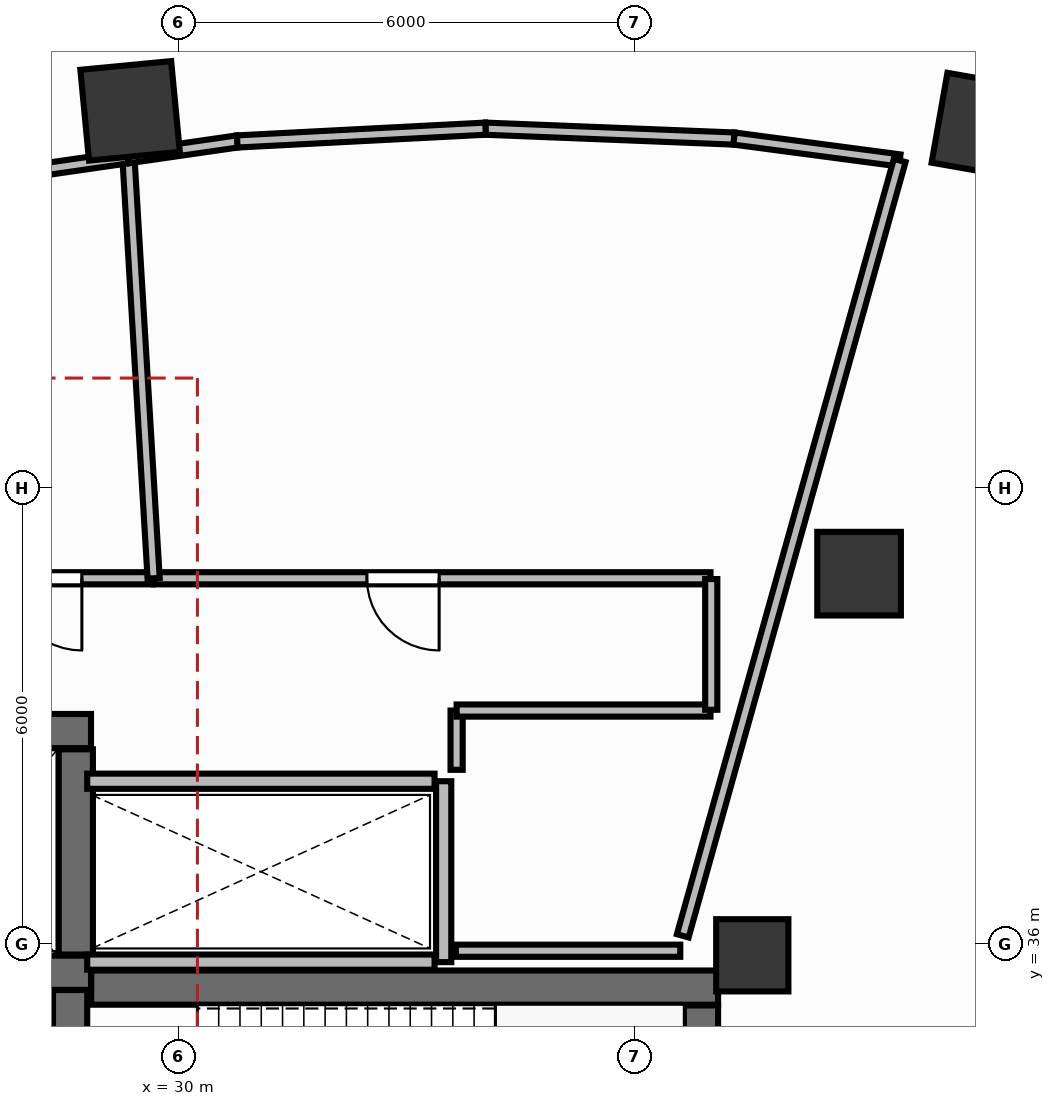
"""IFC4 building model, lengths in metres.
Left out: names, types, materials, properties, quantities, classifications, styles, units other than length and angle.
Written with IfcOpenShell. Run it as: python <this file> out.ifc"""

import sys

from ifc_helpers import new_model, si_unit, direction, frame, frame_2d, origin, origin_2d, place, context, subcontext, project, spatial, rectangle, extrude, element, fill, save


model = new_model("IFC4")
c1 = context("Model", 3, precision=1e-05, world=origin(), true_north=direction((0.0, 1.0)))
c2 = subcontext(c1, "Body", "Model", "MODEL_VIEW")
j1 = project(units=[si_unit("LENGTHUNIT", "METRE"), si_unit("PLANEANGLEUNIT", "RADIAN")], contexts=[c1])
p1 = place(None, origin())
s1 = spatial("IfcSite", under=j1, at=p1, CompositionType="ELEMENT")
p2 = place(p1, origin())
s2 = spatial("IfcBuilding", under=s1, at=p2, CompositionType="ELEMENT")
p3 = place(p2, frame((0.0, 0.0, 84.6)))
s3 = spatial("IfcBuildingStorey", under=s2, at=p3, CompositionType="ELEMENT", Elevation=84.6)
p4 = place(p3, frame((28.852, 35.425, 0.0), z_axis=(0.0, 0.0, 1.0), x_axis=(1.0, 0.0, 0.0)))
e1 = element("IfcWall", 1, at=p4, inside=s3, PredefinedType="SHEAR", context=c2, shape_type="SweptSolid", body=[
    extrude(rectangle(XDim=8.248, YDim=0.45, at=frame_2d((4.124, 0.0))), origin(), (0.0, 0.0, 1.0), 5.1),
])
p5 = place(p3, frame((36.875, 32.11, 0.0), z_axis=(0.0, 0.0, 1.0), x_axis=(0.0, 1.0, 0.0)))
e2 = element("IfcWall", 2, at=p5, inside=s3, PredefinedType="SHEAR", context=c2, shape_type="SweptSolid", body=[
    extrude(rectangle(XDim=3.08, YDim=0.45, at=frame_2d((1.54, 0.0))), origin(), (0.0, 0.0, 1.0), 5.1),
])
p6 = place(p3, frame((28.575, 32.11, 0.0), z_axis=(0.0, 0.0, 1.0), x_axis=(0.0, 1.0, 0.0)))
e3 = element("IfcWall", 3, at=p6, inside=s3, PredefinedType="SHEAR", context=c2, shape_type="SweptSolid", body=[
    extrude(rectangle(XDim=3.283, YDim=0.45, at=frame_2d((1.642, 0.0))), origin(), (0.0, 0.0, 1.0), 5.1),
])
p7 = place(p6, frame((0.2, 0.0, 0.0)))
e4 = element("IfcOpeningElement", 4, at=p7, cuts=e3, PredefinedType="OPENING", context=c2, shape_type="SweptSolid", body=[
    extrude(rectangle(XDim=1.05, YDim=2.15, at=frame_2d((0.525, 1.075))), frame((0.0, 0.24, 0.0), z_axis=(0.0, -1.0, 0.0), x_axis=(1.0, 0.0, 0.0)), (0.0, 0.0, 1.0), 0.48),
])
p8 = place(p3, frame((25.75, 38.8, 0.0), z_axis=(0.0, 0.0, 1.0), x_axis=(1.0, 0.0, 0.0)))
e5 = element("IfcWall", 5, at=p8, inside=s3, PredefinedType="SHEAR", context=c2, shape_type="SweptSolid", body=[
    extrude(rectangle(XDim=3.1, YDim=0.45, at=frame_2d((1.55, 0.0))), origin(), (0.0, 0.0, 1.0), 5.1),
])
p9 = place(p3, frame((25.75, 35.62, 0.0), z_axis=(0.0, 0.0, 1.0), x_axis=(1.0, 0.0, 0.0)))
e6 = element("IfcWall", 6, at=p9, inside=s3, PredefinedType="SHEAR", context=c2, shape_type="SweptSolid", body=[
    extrude(rectangle(XDim=3.1, YDim=0.45, at=frame_2d((1.55, 0.0))), origin(), (0.0, 0.0, 1.0), 5.1),
])
p10 = place(p9, frame((0.9, 0.0, 0.0)))
e7 = element("IfcOpeningElement", 7, at=p10, cuts=e6, PredefinedType="OPENING", context=c2, shape_type="SweptSolid", body=[
    extrude(rectangle(XDim=1.3, YDim=2.2, at=frame_2d((0.65, 1.1))), frame((0.0, 0.24, 0.0), z_axis=(0.0, -1.0, 0.0), x_axis=(1.0, 0.0, 0.0)), (0.0, 0.0, 1.0), 0.48),
])
p11 = place(p3, frame((28.65, 35.86, 0.0), z_axis=(0.0, 0.0, 1.0), x_axis=(0.0, 1.0, 0.0)))
e8 = element("IfcWall", 8, at=p11, inside=s3, PredefinedType="SHEAR", context=c2, shape_type="SweptSolid", body=[
    extrude(rectangle(XDim=2.7, YDim=0.45, at=frame_2d((1.35, 0.0))), origin(), (0.0, 0.0, 1.0), 5.1),
])
p12 = place(p3, frame((37.55, 35.85, -0.0), z_axis=(0.0, 0.0, 1.0), x_axis=(1.0, 0.0, 0.0)))
e9 = element("IfcColumn", 9, at=p12, inside=s3, PredefinedType="PILASTER", context=c2, shape_type="SweptSolid", body=[
    extrude(rectangle(XDim=0.95, YDim=0.95, at=origin_2d()), origin(), (0.0, 0.0, 1.0), 5.101),
])
p13 = place(p3, frame((40.604, 46.765, -0.0), z_axis=(0.0, 0.0, 1.0), x_axis=(-0.984868307662, 0.173304404339, 0.0)))
e10 = element("IfcColumn", 10, at=p13, inside=s3, PredefinedType="COLUMN", context=c2, shape_type="SweptSolid", body=[
    extrude(rectangle(XDim=1.2, YDim=1.2, at=origin_2d()), origin(), (0.0, 0.0, 1.0), 5.101),
])
p14 = place(p3, frame((38.955, 40.871, -0.0), z_axis=(0.0, 0.0, 1.0), x_axis=(1.0, 0.0, 0.0)))
e11 = element("IfcColumn", 11, at=p14, inside=s3, PredefinedType="COLUMN", context=c2, shape_type="SweptSolid", body=[
    extrude(rectangle(XDim=1.1, YDim=1.1, at=origin_2d()), origin(), (0.0, 0.0, 1.0), 5.101),
])
p15 = place(p3, frame((29.364, 46.959, -0.0), z_axis=(0.0, 0.0, 1.0), x_axis=(0.995462868748, 0.095150811579, 0.0)))
e12 = element("IfcColumn", 12, at=p15, inside=s3, PredefinedType="COLUMN", context=c2, shape_type="SweptSolid", body=[
    extrude(rectangle(XDim=1.2, YDim=1.2, at=origin_2d()), origin(), (0.0, 0.0, 1.0), 5.101),
])
p16 = place(p3, frame((33.49, 35.76, 0.0), z_axis=(0.0, 0.0, 1.0), x_axis=(0.0, 1.0, 0.0)))
e13 = element("IfcWall", 13, at=p16, inside=s3, PredefinedType="PARTITIONING", context=c2, shape_type="SweptSolid", body=[
    extrude(rectangle(XDim=2.38, YDim=0.2, at=frame_2d((1.19, 0.0))), origin(), (0.0, 0.0, 1.0), 3.96),
])
for number, where, z_axis, x_axis in (
    (14, (28.8, 35.76, 0.0), (0.0, 0.0, 1.0), (1.0, 0.0, 0.0)),
    (15, (28.8, 38.14, 0.0), (0.0, 0.0, 1.0), (1.0, 0.0, 0.0)),
):
    element("IfcWall", number, at=place(p3, frame(where, z_axis=z_axis, x_axis=x_axis)), inside=s3, PredefinedType="PARTITIONING", context=c2, shape_type="SweptSolid", body=[
        extrude(rectangle(XDim=4.57, YDim=0.2, at=frame_2d((2.285, 0.0))), origin(), (0.0, 0.0, 1.0), 3.96),
    ])
p17 = place(p3, frame((37.0, 40.81, 0.0), z_axis=(0.0, 0.0, 1.0), x_axis=(-1.0, 0.0, 0.0)))
e16 = element("IfcWall", 16, at=p17, inside=s3, PredefinedType="PARTITIONING", context=c2, shape_type="SweptSolid", body=[
    extrude(rectangle(XDim=7.326, YDim=0.16, at=frame_2d((3.663, 0.0))), origin(), (0.0, 0.0, 1.0), 3.96),
])
p18 = place(p17, frame((3.57, 0.0, 0.0)))
e17 = element("IfcOpeningElement", 17, at=p18, cuts=e16, PredefinedType="OPENING", context=c2, shape_type="SweptSolid", body=[
    extrude(rectangle(XDim=0.95, YDim=2.15, at=frame_2d((0.475, 1.075))), frame((0.0, 0.095, 0.0), z_axis=(0.0, -1.0, 0.0), x_axis=(1.0, 0.0, 0.0)), (0.0, 0.0, 1.0), 0.19),
])
p19 = place(p3, frame((29.664, 40.81, 0.0), z_axis=(0.0, 0.0, 1.0), x_axis=(-1.0, 0.0, 0.0)))
e18 = element("IfcWall", 18, at=p19, inside=s3, PredefinedType="PARTITIONING", context=c2, shape_type="SweptSolid", body=[
    extrude(rectangle(XDim=4.359, YDim=0.16, at=frame_2d((2.18, 0.0))), origin(), (0.0, 0.0, 1.0), 3.96),
])
p20 = place(p19, frame((0.934, 0.0, 0.0)))
e19 = element("IfcOpeningElement", 19, at=p20, cuts=e18, PredefinedType="OPENING", context=c2, shape_type="SweptSolid", body=[
    extrude(rectangle(XDim=0.95, YDim=2.15, at=frame_2d((0.475, 1.075))), frame((0.0, 0.095, 0.0), z_axis=(0.0, -1.0, 0.0), x_axis=(1.0, 0.0, 0.0)), (0.0, 0.0, 1.0), 0.19),
])
p21 = place(p3, frame((34.041, 46.725, 0.0), z_axis=(0.0, 0.0, 1.0), x_axis=(0.999211886546, -0.039693901108, 0.0)))
e20 = element("IfcWall", 20, at=p21, inside=s3, PredefinedType="PARTITIONING", context=c2, shape_type="SweptSolid", body=[
    extrude(rectangle(XDim=3.272, YDim=0.16, at=frame_2d((1.636, 0.0))), origin(), (0.0, 0.0, 1.0), 3.96),
])
p22 = place(p3, frame((37.31, 46.595, 0.0), z_axis=(0.0, 0.0, 1.0), x_axis=(0.991362199343, -0.131152543679, 0.0)))
e21 = element("IfcWall", 21, at=p22, inside=s3, PredefinedType="PARTITIONING", context=c2, shape_type="SweptSolid", body=[
    extrude(rectangle(XDim=2.198, YDim=0.16, at=frame_2d((1.099, 0.0))), origin(), (0.0, 0.0, 1.0), 3.96),
])
p23 = place(p3, frame((39.49, 46.307, 0.0), z_axis=(0.0, 0.0, 1.0), x_axis=(-0.269475187002, -0.963007333093, 0.0)))
e22 = element("IfcWall", 22, at=p23, inside=s3, PredefinedType="PARTITIONING", context=c2, shape_type="SweptSolid", body=[
    extrude(rectangle(XDim=10.593, YDim=0.16, at=frame_2d((5.296, 0.0))), origin(), (0.0, 0.0, 1.0), 3.96),
])
p24 = place(p3, frame((36.602, 35.91, 0.0), z_axis=(0.0, 0.0, 1.0), x_axis=(-1.0, 0.0, 0.0)))
e23 = element("IfcWall", 23, at=p24, inside=s3, PredefinedType="PARTITIONING", context=c2, shape_type="SweptSolid", body=[
    extrude(rectangle(XDim=2.952, YDim=0.16, at=frame_2d((1.476, 0.0))), origin(), (0.0, 0.0, 1.0), 3.96),
])
p25 = place(p3, frame((33.66, 38.29, 0.0), z_axis=(0.0, 0.0, 1.0), x_axis=(0.0, 1.0, 0.0)))
e24 = element("IfcWall", 24, at=p25, inside=s3, PredefinedType="PARTITIONING", context=c2, shape_type="SweptSolid", body=[
    extrude(rectangle(XDim=0.78, YDim=0.16, at=frame_2d((0.39, 0.0))), origin(), (0.0, 0.0, 1.0), 3.96),
])
p26 = place(p3, frame((33.66, 39.07, 0.0), z_axis=(0.0, 0.0, 1.0), x_axis=(1.0, 0.0, 0.0)))
e25 = element("IfcWall", 25, at=p26, inside=s3, PredefinedType="PARTITIONING", context=c2, shape_type="SweptSolid", body=[
    extrude(rectangle(XDim=3.34, YDim=0.16, at=frame_2d((1.67, 0.0))), origin(), (0.0, 0.0, 1.0), 3.96),
])
p27 = place(p3, frame((37.01, 39.08, 0.0), z_axis=(0.0, 0.0, 1.0), x_axis=(0.0, 1.0, 0.0)))
e26 = element("IfcWall", 26, at=p27, inside=s3, PredefinedType="PARTITIONING", context=c2, shape_type="SweptSolid", body=[
    extrude(rectangle(XDim=1.72, YDim=0.16, at=frame_2d((0.86, 0.0))), origin(), (0.0, 0.0, 1.0), 3.96),
])
p28 = place(p3, frame((29.674, 40.81, 0.0), z_axis=(0.0, 0.0, 1.0), x_axis=(-0.059828293561, 0.998208683237, 0.0)))
e27 = element("IfcWall", 27, at=p28, inside=s3, PredefinedType="PARTITIONING", context=c2, shape_type="SweptSolid", body=[
    extrude(rectangle(XDim=5.55, YDim=0.16, at=frame_2d((2.775, 0.0))), origin(), (0.0, 0.0, 1.0), 3.96),
])
p29 = place(p3, frame((29.342, 46.35, 0.0), z_axis=(0.0, 0.0, 1.0), x_axis=(0.98973922772, 0.142885482509, 0.0)))
e28 = element("IfcWall", 28, at=p29, inside=s3, PredefinedType="PARTITIONING", context=c2, shape_type="SweptSolid", body=[
    extrude(rectangle(XDim=1.447, YDim=0.16, at=frame_2d((0.724, 0.0))), origin(), (0.0, 0.0, 1.0), 3.96),
])
p30 = place(p3, frame((30.774, 46.557, 0.0), z_axis=(0.0, 0.0, 1.0), x_axis=(0.998672543276, 0.051508749803, 0.0)))
e29 = element("IfcWall", 29, at=p30, inside=s3, PredefinedType="PARTITIONING", context=c2, shape_type="SweptSolid", body=[
    extrude(rectangle(XDim=3.271, YDim=0.16, at=frame_2d((1.635, 0.0))), origin(), (0.0, 0.0, 1.0), 3.96),
])
p31 = place(p3, frame((27.562, 46.093, 0.0), z_axis=(0.0, 0.0, 1.0), x_axis=(0.989746382277, 0.142835915544, 0.0)))
e30 = element("IfcWall", 30, at=p31, inside=s3, PredefinedType="PARTITIONING", context=c2, shape_type="SweptSolid", body=[
    extrude(rectangle(XDim=1.788, YDim=0.16, at=frame_2d((0.894, 0.0))), origin(), (0.0, 0.0, 1.0), 3.96),
])
p32 = place(p18, origin())
e31 = element("IfcDoor", 31, at=p32, inside=s3, OperationType="SINGLE_SWING_LEFT", PredefinedType="DOOR", context=c2, shape_type="SweptSolid", body=[
    extrude(rectangle(XDim=0.95, YDim=2.15, at=frame_2d((0.475, 1.075))), frame((0.0, 0.025, 0.0), z_axis=(0.0, -1.0, 0.0), x_axis=(1.0, 0.0, 0.0)), (0.0, 0.0, 1.0), 0.05),
])
fill(e17, e31)
p33 = place(p20, origin())
e32 = element("IfcDoor", 32, at=p33, inside=s3, OperationType="SINGLE_SWING_LEFT", PredefinedType="DOOR", context=c2, shape_type="SweptSolid", body=[
    extrude(rectangle(XDim=0.95, YDim=2.15, at=frame_2d((0.475, 1.075))), frame((0.0, 0.025, 0.0), z_axis=(0.0, -1.0, 0.0), x_axis=(1.0, 0.0, 0.0)), (0.0, 0.0, 1.0), 0.05),
])
fill(e19, e32)
save(model, sys.argv[1])
